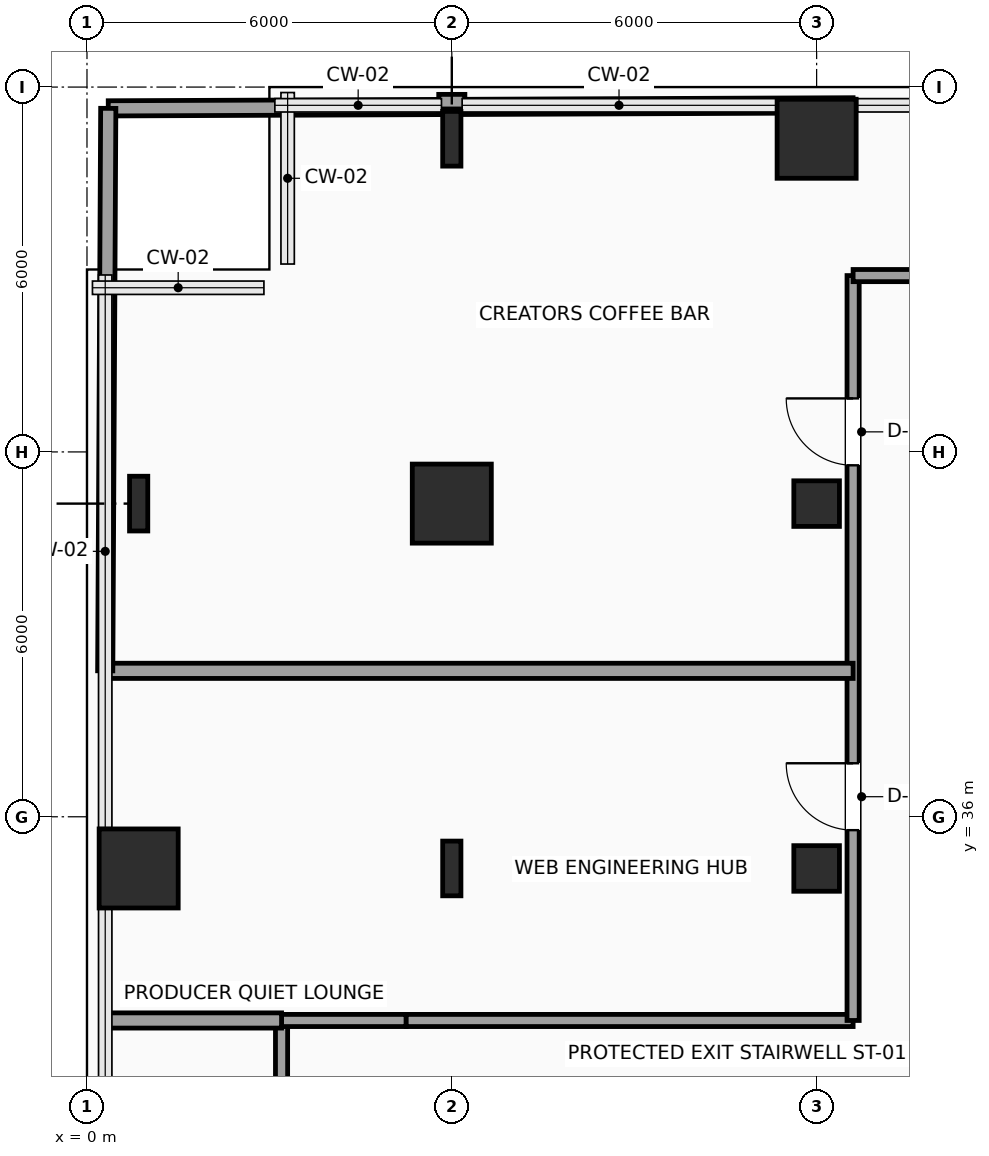
"""IFC4 building model, lengths in metres.
Left out: names, types, materials, properties, quantities, classifications, styles, units other than length and angle.
Written with IfcOpenShell. Run it as: python <this file> out.ifc"""

import sys

from ifc_helpers import new_model, si_unit, direction, frame, frame_2d, origin, origin_2d, place, context, subcontext, project, spatial, rectangle, hollow_rectangle, i_section, extrude, element, fill, save


model = new_model("IFC4")
c1 = context("Model", 3, precision=1e-05, world=origin(), true_north=direction((0.0, 1.0)))
c2 = subcontext(c1, "Body", "Model", "MODEL_VIEW")
j1 = project(units=[si_unit("LENGTHUNIT", "METRE"), si_unit("PLANEANGLEUNIT", "RADIAN")], contexts=[c1])
p1 = place(None, origin())
s1 = spatial("IfcSite", under=j1, at=p1, CompositionType="ELEMENT")
p2 = place(p1, origin())
s2 = spatial("IfcBuilding", under=s1, at=p2, CompositionType="ELEMENT")
p3 = place(p2, frame((0.0, 0.0, 79.2)))
s3 = spatial("IfcBuildingStorey", under=s2, at=p3, CompositionType="ELEMENT", Elevation=79.2)
p4 = place(p3, frame((0.85, 35.15, 0.0), z_axis=(0.0, 0.0, 1.0), x_axis=(1.0, 0.0, 0.0)))
e1 = element("IfcColumn", 1, at=p4, inside=s3, PredefinedType="COLUMN", context=c2, shape_type="SweptSolid", body=[
    extrude(rectangle(XDim=1.3, YDim=1.3, at=origin_2d()), origin(), (0.0, 0.0, 1.0), 3.9),
])
for number, where, z_axis, x_axis in (
    (2, (0.85, 41.15, 0.0), (0.0, 0.0, 1.0), (1.0, 0.0, 0.0)),
    (3, (6.0, 35.15, 0.0), (0.0, 0.0, 1.0), (1.0, 0.0, 0.0)),
):
    element("IfcColumn", number, at=place(p3, frame(where, z_axis=z_axis, x_axis=x_axis)), inside=s3, PredefinedType="COLUMN", context=c2, shape_type="SweptSolid", body=[
        extrude(i_section(OverallWidth=0.3, OverallDepth=0.9, WebThickness=0.019, FlangeThickness=0.035, FilletRadius=0.03, at=origin_2d()), origin(), (0.0, 0.0, 1.0), 3.9),
    ])
p5 = place(p3, frame((6.0, 41.15, 0.0), z_axis=(0.0, 0.0, 1.0), x_axis=(1.0, 0.0, 0.0)))
e4 = element("IfcColumn", 4, at=p5, inside=s3, PredefinedType="COLUMN", context=c2, shape_type="SweptSolid", body=[
    extrude(rectangle(XDim=1.3, YDim=1.3, at=origin_2d()), origin(), (0.0, 0.0, 1.0), 3.9),
])
p6 = place(p3, frame((6.0, 47.15, 0.0), z_axis=(0.0, 0.0, 1.0), x_axis=(1.0, 0.0, 0.0)))
e5 = element("IfcColumn", 5, at=p6, inside=s3, PredefinedType="COLUMN", context=c2, shape_type="SweptSolid", body=[
    extrude(i_section(OverallWidth=0.3, OverallDepth=0.9, WebThickness=0.019, FlangeThickness=0.035, FilletRadius=0.03, at=origin_2d()), origin(), (0.0, 0.0, 1.0), 3.9),
])
for number, where, z_axis, x_axis in (
    (6, (12.0, 35.15, 0.0), (0.0, 0.0, 1.0), (1.0, 0.0, 0.0)),
    (7, (12.0, 41.15, 0.0), (0.0, 0.0, 1.0), (1.0, 0.0, 0.0)),
):
    element("IfcColumn", number, at=place(p3, frame(where, z_axis=z_axis, x_axis=x_axis)), inside=s3, PredefinedType="COLUMN", context=c2, shape_type="SweptSolid", body=[
        extrude(hollow_rectangle(XDim=0.75, YDim=0.75, WallThickness=0.035, InnerFilletRadius=0.035, OuterFilletRadius=0.05, at=origin_2d()), origin(), (0.0, 0.0, 1.0), 3.9),
    ])
p7 = place(p3, frame((12.0, 47.15, 0.0), z_axis=(0.0, 0.0, 1.0), x_axis=(1.0, 0.0, 0.0)))
e8 = element("IfcColumn", 8, at=p7, inside=s3, PredefinedType="COLUMN", context=c2, shape_type="SweptSolid", body=[
    extrude(rectangle(XDim=1.3, YDim=1.3, at=origin_2d()), origin(), (0.0, 0.0, 1.0), 3.9),
])
p8 = place(p3, frame((5.785, 47.76, 0.0), z_axis=(0.0, 0.0, 1.0), x_axis=(1.0, 0.0, 0.0)))
e9 = element("IfcWall", 9, at=p8, inside=s3, PredefinedType="SOLIDWALL", context=c2, shape_type="SweptSolid", body=[
    extrude(rectangle(XDim=0.43, YDim=0.24, at=frame_2d((0.215, 0.0))), origin(), (0.0, 0.0, 1.0), 3.65),
])
p9 = place(p3, frame((3.2, 30.25, 0.0), z_axis=(0.0, 0.0, 1.0), x_axis=(0.0, 1.0, 0.0)))
e10 = element("IfcWall", 10, at=p9, inside=s3, PredefinedType="PARTITIONING", context=c2, shape_type="SweptSolid", body=[
    extrude(rectangle(XDim=2.4, YDim=0.2, at=frame_2d((1.2, 0.0))), origin(), (0.0, 0.0, 1.0), 3.65),
])
p10 = place(p3, frame((3.2, 32.65, 0.0), z_axis=(0.0, 0.0, 1.0), x_axis=(1.0, 0.0, 0.0)))
e11 = element("IfcWall", 11, at=p10, inside=s3, PredefinedType="PARTITIONING", context=c2, shape_type="SweptSolid", body=[
    extrude(rectangle(XDim=2.05, YDim=0.2, at=frame_2d((1.025, 0.0))), origin(), (0.0, 0.0, 1.0), 3.65),
])
p11 = place(p3, frame((5.25, 32.65, 0.0), z_axis=(0.0, 0.0, 1.0), x_axis=(1.0, 0.0, 0.0)))
e12 = element("IfcWall", 12, at=p11, inside=s3, PredefinedType="PARTITIONING", context=c2, shape_type="SweptSolid", body=[
    extrude(rectangle(XDim=7.35, YDim=0.2, at=frame_2d((3.675, 0.0))), origin(), (0.0, 0.0, 1.0), 3.65),
])
p12 = place(p3, frame((12.6, 32.65, 0.0), z_axis=(0.0, 0.0, 1.0), x_axis=(0.0, 1.0, 0.0)))
e13 = element("IfcWall", 13, at=p12, inside=s3, PredefinedType="PARTITIONING", context=c2, shape_type="SweptSolid", body=[
    extrude(rectangle(XDim=12.25, YDim=0.2, at=frame_2d((6.125, 0.0))), origin(), (0.0, 0.0, 1.0), 3.65),
])
p13 = place(p12, frame((3.13, 0.0, 0.0)))
e14 = element("IfcOpeningElement", 14, at=p13, cuts=e13, PredefinedType="OPENING", context=c2, shape_type="SweptSolid", body=[
    extrude(rectangle(XDim=1.1, YDim=2.25, at=frame_2d((0.55, 1.125))), frame((0.0, 0.11, 0.0), z_axis=(0.0, -1.0, 0.0), x_axis=(1.0, 0.0, 0.0)), (0.0, 0.0, 1.0), 0.22),
])
p14 = place(p12, frame((9.13, 0.0, 0.0)))
e15 = element("IfcOpeningElement", 15, at=p14, cuts=e13, PredefinedType="OPENING", context=c2, shape_type="SweptSolid", body=[
    extrude(rectangle(XDim=1.1, YDim=2.25, at=frame_2d((0.55, 1.125))), frame((0.0, 0.11, 0.0), z_axis=(0.0, -1.0, 0.0), x_axis=(1.0, 0.0, 0.0)), (0.0, 0.0, 1.0), 0.22),
])
p15 = place(p3, frame((12.6, 44.9, 0.0), z_axis=(0.0, 0.0, 1.0), x_axis=(1.0, 0.0, 0.0)))
e16 = element("IfcWall", 16, at=p15, inside=s3, PredefinedType="PARTITIONING", context=c2, shape_type="SweptSolid", body=[
    extrude(rectangle(XDim=2.35, YDim=0.2, at=frame_2d((1.175, 0.0))), origin(), (0.0, 0.0, 1.0), 3.65),
])
p16 = place(p3, frame((0.3, 38.4, 0.0), z_axis=(0.0, 0.0, 1.0), x_axis=(1.0, 0.0, 0.0)))
e17 = element("IfcWall", 17, at=p16, inside=s3, PredefinedType="PARTITIONING", context=c2, shape_type="SweptSolid", body=[
    extrude(rectangle(XDim=12.3, YDim=0.25, at=frame_2d((6.15, 0.0))), origin(), (0.0, 0.0, 1.0), 3.142),
])
p17 = place(p3, frame((0.35, 47.65, 0.0), z_axis=(0.0, 0.0, 1.0), x_axis=(0.999991644778, 0.004087832518, 0.0)))
e18 = element("IfcWall", 18, at=p17, inside=s3, PredefinedType="PARTITIONING", context=c2, shape_type="SweptSolid", body=[
    extrude(rectangle(XDim=5.435, YDim=0.25, at=frame_2d((2.717, 0.0))), origin(), (0.0, 0.0, 1.0), 3.65),
])
p18 = place(p3, frame((6.215, 47.674, 0.0), z_axis=(0.0, 0.0, 1.0), x_axis=(0.999991630701, 0.004091274595, 0.0)))
e19 = element("IfcWall", 19, at=p18, inside=s3, PredefinedType="PARTITIONING", context=c2, shape_type="SweptSolid", body=[
    extrude(rectangle(XDim=6.385, YDim=0.25, at=frame_2d((3.192, 0.0))), origin(), (0.0, 0.0, 1.0), 3.65),
])
p19 = place(p3, frame((0.3, 38.4, 0.0), z_axis=(0.0, 0.0, 1.0), x_axis=(0.005410604923, 0.99998536257, 0.0)))
e20 = element("IfcWall", 20, at=p19, inside=s3, PredefinedType="PARTITIONING", context=c2, shape_type="SweptSolid", body=[
    extrude(rectangle(XDim=9.25, YDim=0.25, at=frame_2d((4.625, 0.0))), origin(), (0.0, 0.0, 1.0), 3.65),
])
p20 = place(p3, frame((0.3, 32.65, 0.0), z_axis=(0.0, 0.0, 1.0), x_axis=(1.0, 0.0, 0.0)))
e21 = element("IfcWall", 21, at=p20, inside=s3, PredefinedType="PARTITIONING", context=c2, shape_type="SweptSolid", body=[
    extrude(rectangle(XDim=2.9, YDim=0.25, at=frame_2d((1.45, 0.0))), origin(), (0.0, 0.0, 1.0), 3.65),
])
p21 = place(p13, origin())
e22 = element("IfcDoor", 22, at=p21, inside=s3, OperationType="SINGLE_SWING_RIGHT", PredefinedType="DOOR", context=c2, shape_type="SweptSolid", body=[
    extrude(rectangle(XDim=1.1, YDim=2.25, at=frame_2d((0.55, 1.125))), frame((0.0, 0.025, 0.0), z_axis=(0.0, -1.0, 0.0), x_axis=(1.0, 0.0, 0.0)), (0.0, 0.0, 1.0), 0.05),
])
fill(e14, e22)
p22 = place(p14, origin())
e23 = element("IfcDoor", 23, at=p22, inside=s3, OperationType="SINGLE_SWING_RIGHT", PredefinedType="DOOR", context=c2, shape_type="SweptSolid", body=[
    extrude(rectangle(XDim=1.1, YDim=2.25, at=frame_2d((0.55, 1.125))), frame((0.0, 0.025, 0.0), z_axis=(0.0, -1.0, 0.0), x_axis=(1.0, 0.0, 0.0)), (0.0, 0.0, 1.0), 0.05),
])
fill(e15, e23)
save(model, sys.argv[1])
